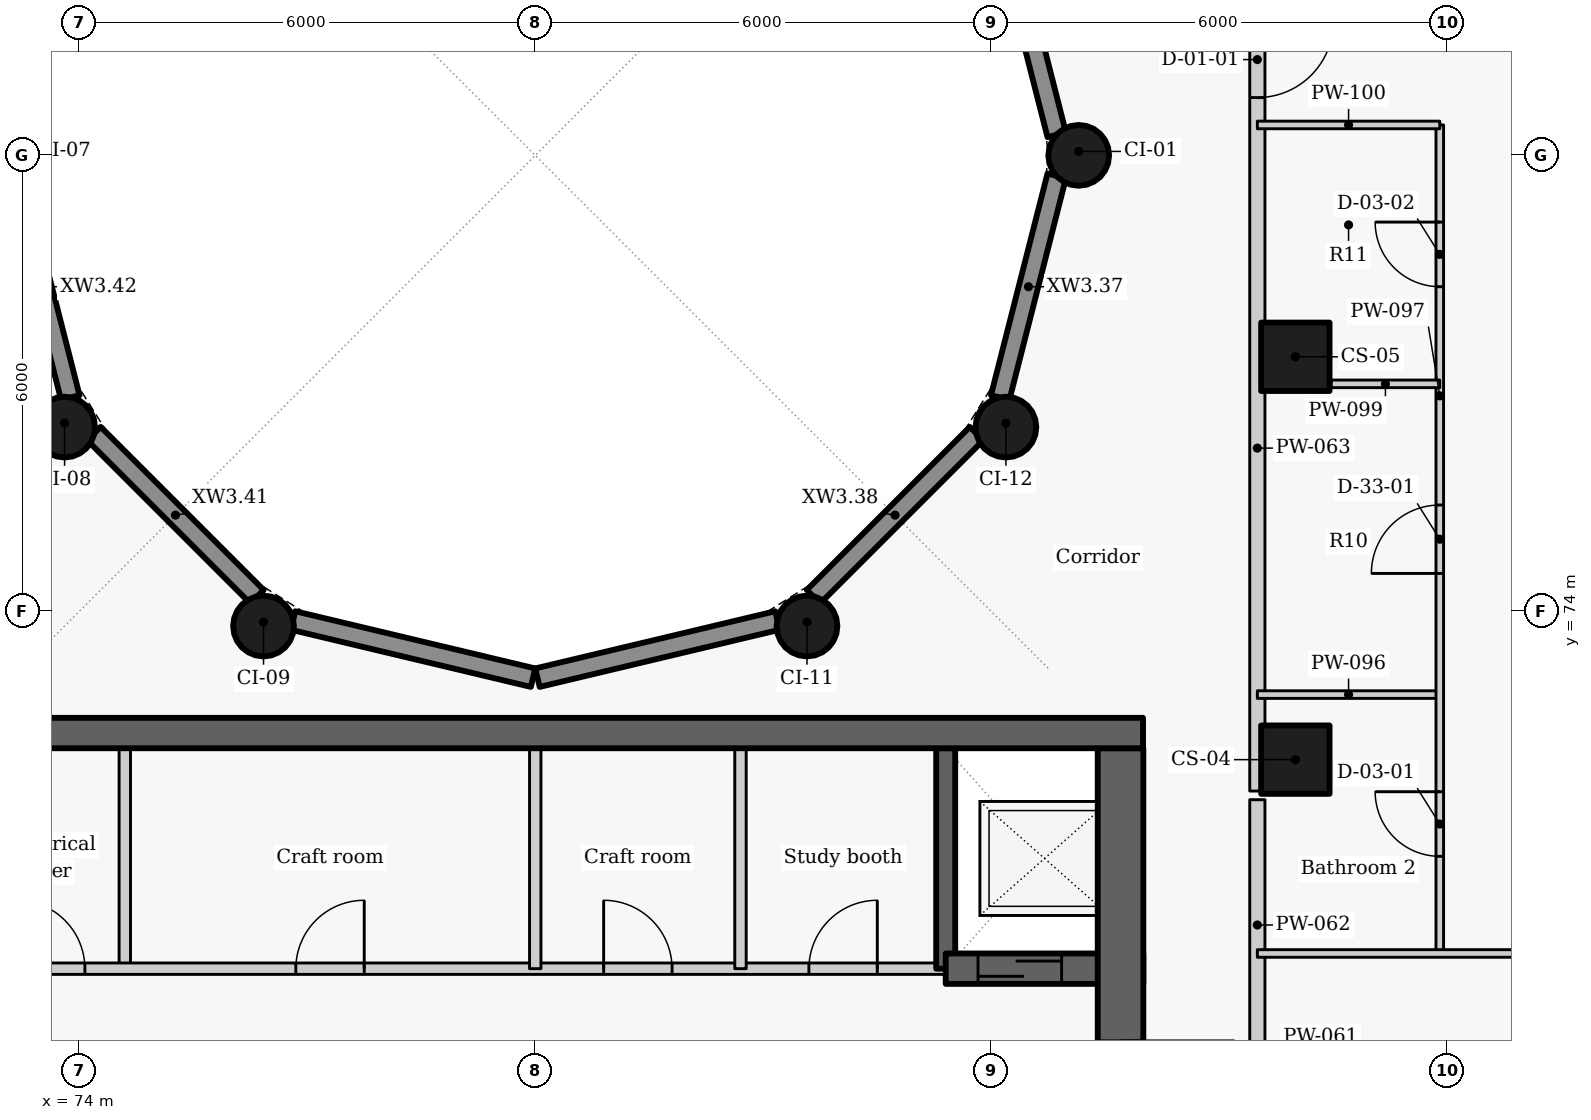
"""IFC4 building model, lengths in metres.
Left out: names, types, materials, properties, quantities, classifications, styles, units other than length and angle.
Written with IfcOpenShell. Run it as: python <this file> out.ifc"""

import sys

from ifc_helpers import new_model, si_unit, direction, frame, frame_2d, origin, origin_2d, place, context, subcontext, project, spatial, rectangle, circle, extrude, element, fill, save


model = new_model("IFC4")
c1 = context("Model", 3, precision=1e-05, world=origin(), true_north=direction((0.0, 1.0)))
c2 = subcontext(c1, "Body", "Model", "MODEL_VIEW")
j1 = project(units=[si_unit("LENGTHUNIT", "METRE"), si_unit("PLANEANGLEUNIT", "RADIAN")], contexts=[c1])
p1 = place(None, origin())
s1 = spatial("IfcSite", under=j1, at=p1, CompositionType="ELEMENT")
p2 = place(p1, origin())
s2 = spatial("IfcBuilding", under=s1, at=p2, CompositionType="ELEMENT")
p3 = place(p2, frame((0.0, 0.0, 249.3)))
s3 = spatial("IfcBuildingStorey", under=s2, at=p3, CompositionType="ELEMENT", Elevation=249.3)
for number, where, z_axis, x_axis in (
    (1, (90.0, 72.05, 0.0), (0.0, 0.0, 1.0), (0.0, 1.0, 0.0)),
    (2, (90.0, 77.35, 0.0), (0.0, 0.0, 1.0), (0.0, 1.0, 0.0)),
):
    element("IfcColumn", number, at=place(p3, frame(where, z_axis=z_axis, x_axis=x_axis)), inside=s3, PredefinedType="COLUMN", context=c2, shape_type="SweptSolid", body=[
        extrude(rectangle(XDim=0.9, YDim=0.9, at=origin_2d()), origin(), (0.0, 0.0, 1.0), 3.3),
    ])
for number, where, z_axis, x_axis in (
    (3, (87.15, 80.0, 0.0), (0.0, 0.0, 1.0), (0.0, 1.0, 0.0)),
    (4, (73.808, 76.425, 0.0), (0.0, 0.0, 1.0), (0.5, -0.866, 0.0)),
    (5, (76.425, 73.808, 0.0), (0.0, 0.0, 1.0), (0.866, -0.5, 0.0)),
    (6, (83.575, 73.808, 0.0), (0.0, 0.0, 1.0), (0.866, 0.5, 0.0)),
    (7, (86.192, 76.425, 0.0), (0.0, 0.0, 1.0), (0.5, 0.866, 0.0)),
):
    element("IfcColumn", number, at=place(p3, frame(where, z_axis=z_axis, x_axis=x_axis)), inside=s3, PredefinedType="COLUMN", context=c2, shape_type="SweptSolid", body=[
        extrude(circle(Radius=0.4, at=origin_2d()), origin(), (0.0, 0.0, 1.0), 3.3),
    ])
p4 = place(p3, frame((86.86, 79.73, 0.0), z_axis=(0.0, 0.0, 1.0), x_axis=(-0.247055971283, -0.969001211069, 0.0)))
e8 = element("IfcWall", 8, at=p4, inside=s3, PredefinedType="SOLIDWALL", context=c2, shape_type="SweptSolid", body=[
    extrude(rectangle(XDim=3.01, YDim=0.25, at=frame_2d((1.505, 0.0))), origin(), (0.0, 0.0, 1.0), 2.425),
])
p5 = place(p3, frame((85.806, 76.339, 0.0), z_axis=(0.0, 0.0, 1.0), x_axis=(-0.707106781187, -0.707106781187, 0.0)))
e9 = element("IfcWall", 9, at=p5, inside=s3, PredefinedType="SOLIDWALL", context=c2, shape_type="SweptSolid", body=[
    extrude(rectangle(XDim=3.033, YDim=0.25, at=frame_2d((1.517, 0.0))), origin(), (0.0, 0.0, 1.0), 2.425),
])
for number, where, z_axis, x_axis in (
    (10, (83.186, 73.881, 0.0), (0.0, 0.0, 1.0), (-0.973, -0.232, 0.0)),
    (11, (79.971, 73.128, 0.0), (0.0, 0.0, 1.0), (-0.973, 0.232, 0.0)),
):
    element("IfcWall", number, at=place(p3, frame(where, z_axis=z_axis, x_axis=x_axis)), inside=s3, PredefinedType="SOLIDWALL", context=c2, shape_type="SweptSolid", body=[
        extrude(rectangle(XDim=3.246, YDim=0.25, at=frame_2d((1.623, 0.0))), origin(), (0.0, 0.0, 1.0), 2.425),
    ])
p6 = place(p3, frame((76.339, 74.194, 0.0), z_axis=(0.0, 0.0, 1.0), x_axis=(-0.707106781187, 0.707106781187, 0.0)))
e12 = element("IfcWall", 12, at=p6, inside=s3, PredefinedType="SOLIDWALL", context=c2, shape_type="SweptSolid", body=[
    extrude(rectangle(XDim=3.033, YDim=0.25, at=frame_2d((1.517, 0.0))), origin(), (0.0, 0.0, 1.0), 2.425),
])
for number, where, z_axis, x_axis in (
    (13, (73.883, 76.813, 0.0), (0.0, 0.0, 1.0), (-0.247, 0.969, 0.0)),
    (14, (73.14, 80.27, 0.0), (0.0, 0.0, 1.0), (0.247, 0.969, 0.0)),
    (15, (86.117, 83.187, 0.0), (0.0, 0.0, 1.0), (0.247, -0.969, 0.0)),
):
    element("IfcWall", number, at=place(p3, frame(where, z_axis=z_axis, x_axis=x_axis)), inside=s3, PredefinedType="SOLIDWALL", context=c2, shape_type="SweptSolid", body=[
        extrude(rectangle(XDim=3.01, YDim=0.25, at=frame_2d((1.505, 0.0))), origin(), (0.0, 0.0, 1.0), 2.425),
    ])
p7 = place(p3, frame((74.6, 69.3, 0.0), z_axis=(0.0, 0.0, 1.0), x_axis=(0.0, 1.0, 0.0)))
e16 = element("IfcWall", 16, at=p7, inside=s3, PredefinedType="PARTITIONING", context=c2, shape_type="SweptSolid", body=[
    extrude(rectangle(XDim=2.9, YDim=0.15, at=frame_2d((1.45, 0.0))), origin(), (0.0, 0.0, 1.0), 3.025),
])
p8 = place(p3, frame((72.0, 69.3, 0.0), z_axis=(0.0, 0.0, 1.0), x_axis=(1.0, 0.0, 0.0)))
e17 = element("IfcWall", 17, at=p8, inside=s3, PredefinedType="PARTITIONING", context=c2, shape_type="SweptSolid", body=[
    extrude(rectangle(XDim=13.4, YDim=0.15, at=frame_2d((6.7, 0.0))), origin(), (0.0, 0.0, 1.0), 3.025),
])
p9 = place(p8, frame((1.175, 0.0, 0.0)))
e18 = element("IfcOpeningElement", 18, at=p9, cuts=e17, PredefinedType="OPENING", context=c2, shape_type="SweptSolid", body=[
    extrude(rectangle(XDim=0.9, YDim=2.1, at=frame_2d((0.45, 1.05))), frame((0.0, 0.085, 0.0), z_axis=(0.0, -1.0, 0.0), x_axis=(1.0, 0.0, 0.0)), (0.0, 0.0, 1.0), 0.17),
])
p10 = place(p8, frame((4.85, 0.0, 0.0)))
e19 = element("IfcOpeningElement", 19, at=p10, cuts=e17, PredefinedType="OPENING", context=c2, shape_type="SweptSolid", body=[
    extrude(rectangle(XDim=0.9, YDim=2.1, at=frame_2d((0.45, 1.05))), frame((0.0, 0.085, 0.0), z_axis=(0.0, -1.0, 0.0), x_axis=(1.0, 0.0, 0.0)), (0.0, 0.0, 1.0), 0.17),
])
p11 = place(p8, frame((8.9, 0.0, 0.0)))
e20 = element("IfcOpeningElement", 20, at=p11, cuts=e17, PredefinedType="OPENING", context=c2, shape_type="SweptSolid", body=[
    extrude(rectangle(XDim=0.9, YDim=2.1, at=frame_2d((0.45, 1.05))), frame((0.0, 0.085, 0.0), z_axis=(0.0, -1.0, 0.0), x_axis=(1.0, 0.0, 0.0)), (0.0, 0.0, 1.0), 0.17),
])
p12 = place(p8, frame((11.6, 0.0, 0.0)))
e21 = element("IfcOpeningElement", 21, at=p12, cuts=e17, PredefinedType="OPENING", context=c2, shape_type="SweptSolid", body=[
    extrude(rectangle(XDim=0.9, YDim=2.1, at=frame_2d((0.45, 1.05))), frame((0.0, 0.085, 0.0), z_axis=(0.0, -1.0, 0.0), x_axis=(1.0, 0.0, 0.0)), (0.0, 0.0, 1.0), 0.17),
])
p13 = place(p3, frame((85.4, 69.3, -0.275), z_axis=(0.0, 0.0, 1.0), x_axis=(0.0, 1.0, 0.0)))
e22 = element("IfcWall", 22, at=p13, inside=s3, PredefinedType="SHEAR", context=c2, shape_type="SweptSolid", body=[
    extrude(rectangle(XDim=2.9, YDim=0.25, at=frame_2d((1.45, 0.0))), origin(), (0.0, 0.0, 1.0), 3.3),
])
p14 = place(p3, frame((85.4, 69.3, -0.275), z_axis=(0.0, 0.0, 1.0), x_axis=(1.0, 0.0, 0.0)))
e23 = element("IfcWall", 23, at=p14, inside=s3, PredefinedType="SHEAR", context=c2, shape_type="SweptSolid", body=[
    extrude(rectangle(XDim=2.6, YDim=0.4, at=frame_2d((1.3, 0.0))), origin(), (0.0, 0.0, 1.0), 3.3),
])
p15 = place(p14, frame((0.425, 0.0, 0.275)))
e24 = element("IfcOpeningElement", 24, at=p15, cuts=e23, PredefinedType="OPENING", context=c2, shape_type="SweptSolid", body=[
    extrude(rectangle(XDim=1.1, YDim=2.1, at=frame_2d((0.55, 1.05))), frame((0.0, 0.21, 0.0), z_axis=(0.0, -1.0, 0.0), x_axis=(1.0, 0.0, 0.0)), (0.0, 0.0, 1.0), 0.42),
])
p16 = place(p3, frame((87.7, 72.2, -0.275), z_axis=(0.0, 0.0, 1.0), x_axis=(0.0, -1.0, 0.0)))
e25 = element("IfcWall", 25, at=p16, inside=s3, PredefinedType="SHEAR", context=c2, shape_type="SweptSolid", body=[
    extrude(rectangle(XDim=14.25, YDim=0.6, at=frame_2d((7.125, 0.0))), origin(), (0.0, 0.0, 1.0), 3.3),
])
p17 = place(p16, frame((3.85, 0.0, 0.275)))
e26 = element("IfcOpeningElement", 26, at=p17, cuts=e25, PredefinedType="OPENING", context=c2, shape_type="SweptSolid", body=[
    extrude(rectangle(XDim=1.5, YDim=2.1, at=frame_2d((0.75, 1.05))), frame((0.0, 0.31, 0.0), z_axis=(0.0, -1.0, 0.0), x_axis=(1.0, 0.0, 0.0)), (0.0, 0.0, 1.0), 0.62),
])
p18 = place(p16, frame((11.125, 0.0, 0.275)))
e27 = element("IfcOpeningElement", 27, at=p18, cuts=e25, PredefinedType="OPENING", context=c2, shape_type="SweptSolid", body=[
    extrude(rectangle(XDim=1.1, YDim=2.1, at=frame_2d((0.55, 1.05))), frame((0.0, 0.31, 0.0), z_axis=(0.0, -1.0, 0.0), x_axis=(1.0, 0.0, 0.0)), (0.0, 0.0, 1.0), 0.62),
])
for number, where, z_axis, x_axis in (
    (28, (80.0, 69.3, 0.0), (0.0, 0.0, 1.0), (0.0, 1.0, 0.0)),
    (29, (82.7, 69.3, 0.0), (0.0, 0.0, 1.0), (0.0, 1.0, 0.0)),
):
    element("IfcWall", number, at=place(p3, frame(where, z_axis=z_axis, x_axis=x_axis)), inside=s3, PredefinedType="PARTITIONING", context=c2, shape_type="SweptSolid", body=[
        extrude(rectangle(XDim=2.9, YDim=0.15, at=frame_2d((1.45, 0.0))), origin(), (0.0, 0.0, 1.0), 3.025),
    ])
p19 = place(p3, frame((89.5, 68.227, 0.0), z_axis=(0.0, 0.0, 1.0), x_axis=(0.0, 1.0, 0.0)))
e30 = element("IfcWall", 30, at=p19, inside=s3, PredefinedType="PARTITIONING", context=c2, shape_type="SweptSolid", body=[
    extrude(rectangle(XDim=3.296, YDim=0.2, at=frame_2d((1.648, 0.0))), origin(), (0.0, 0.0, 1.0), 3.025),
])
p20 = place(p3, frame((89.5, 82.123, 0.0), z_axis=(0.0, 0.0, 1.0), x_axis=(0.0, -1.0, 0.0)))
e31 = element("IfcWall", 31, at=p20, inside=s3, PredefinedType="PARTITIONING", context=c2, shape_type="SweptSolid", body=[
    extrude(rectangle(XDim=10.486, YDim=0.2, at=frame_2d((5.243, 0.0))), origin(), (0.0, 0.0, 1.0), 3.025),
])
p21 = place(p20, frame((0.363, 0.0, 0.0)))
e32 = element("IfcOpeningElement", 32, at=p21, cuts=e31, PredefinedType="OPENING", context=c2, shape_type="SweptSolid", body=[
    extrude(rectangle(XDim=1.0, YDim=2.1, at=frame_2d((0.5, 1.05))), frame((0.0, 0.11, 0.0), z_axis=(0.0, -1.0, 0.0), x_axis=(1.0, 0.0, 0.0)), (0.0, 0.0, 1.0), 0.22),
])
p22 = place(p3, frame((89.5, 72.906, 0.0), z_axis=(0.0, 0.0, 1.0), x_axis=(1.0, 0.0, 0.0)))
e33 = element("IfcWall", 33, at=p22, inside=s3, PredefinedType="PARTITIONING", context=c2, shape_type="SweptSolid", body=[
    extrude(rectangle(XDim=2.4, YDim=0.1, at=frame_2d((1.2, 0.0))), origin(), (0.0, 0.0, 1.0), 2.505),
])
p23 = place(p3, frame((91.9, 69.5, 0.0), z_axis=(0.0, 0.0, 1.0), x_axis=(0.0, 1.0, 0.0)))
e34 = element("IfcWall", 34, at=p23, inside=s3, PredefinedType="PARTITIONING", context=c2, shape_type="SweptSolid", body=[
    extrude(rectangle(XDim=10.9, YDim=0.1, at=frame_2d((5.45, 0.0))), origin(), (0.0, 0.0, 1.0), 3.025),
])
p24 = place(p23, frame((1.278, 0.0, 0.0)))
e35 = element("IfcOpeningElement", 35, at=p24, cuts=e34, PredefinedType="OPENING", context=c2, shape_type="SweptSolid", body=[
    extrude(rectangle(XDim=0.85, YDim=2.1, at=frame_2d((0.425, 1.05))), frame((0.0, 0.06, 0.0), z_axis=(0.0, -1.0, 0.0), x_axis=(1.0, 0.0, 0.0)), (0.0, 0.0, 1.0), 0.12),
])
p25 = place(p23, frame((5.0, 0.0, 0.0)))
e36 = element("IfcOpeningElement", 36, at=p25, cuts=e34, PredefinedType="OPENING", context=c2, shape_type="SweptSolid", body=[
    extrude(rectangle(XDim=0.9, YDim=2.1, at=frame_2d((0.45, 1.05))), frame((0.0, 0.06, 0.0), z_axis=(0.0, -1.0, 0.0), x_axis=(1.0, 0.0, 0.0)), (0.0, 0.0, 1.0), 0.12),
])
p26 = place(p23, frame((8.772, 0.0, 0.0)))
e37 = element("IfcOpeningElement", 37, at=p26, cuts=e34, PredefinedType="OPENING", context=c2, shape_type="SweptSolid", body=[
    extrude(rectangle(XDim=0.85, YDim=2.1, at=frame_2d((0.425, 1.05))), frame((0.0, 0.06, 0.0), z_axis=(0.0, -1.0, 0.0), x_axis=(1.0, 0.0, 0.0)), (0.0, 0.0, 1.0), 0.12),
])
p27 = place(p3, frame((89.5, 69.5, 0.0), z_axis=(0.0, 0.0, 1.0), x_axis=(1.0, 0.0, 0.0)))
e38 = element("IfcWall", 38, at=p27, inside=s3, PredefinedType="PARTITIONING", context=c2, shape_type="SweptSolid", body=[
    extrude(rectangle(XDim=10.245, YDim=0.1, at=frame_2d((5.123, 0.0))), origin(), (0.0, 0.0, 1.0), 2.405),
])
p28 = place(p3, frame((90.47, 76.994, 0.0), z_axis=(0.0, 0.0, 1.0), x_axis=(1.0, 0.0, 0.0)))
e39 = element("IfcWall", 39, at=p28, inside=s3, PredefinedType="PARTITIONING", context=c2, shape_type="SweptSolid", body=[
    extrude(rectangle(XDim=1.43, YDim=0.1, at=frame_2d((0.715, 0.0))), origin(), (0.0, 0.0, 1.0), 3.025),
])
p29 = place(p3, frame((89.5, 80.4, 0.0), z_axis=(0.0, 0.0, 1.0), x_axis=(1.0, 0.0, 0.0)))
e40 = element("IfcWall", 40, at=p29, inside=s3, PredefinedType="PARTITIONING", context=c2, shape_type="SweptSolid", body=[
    extrude(rectangle(XDim=2.4, YDim=0.1, at=frame_2d((1.2, 0.0))), origin(), (0.0, 0.0, 1.0), 2.505),
])
p30 = place(p3, frame((72.004, 72.4, -0.275), z_axis=(0.0, 0.0, 1.0), x_axis=(1.0, 0.0, 0.0)))
e41 = element("IfcWall", 41, at=p30, inside=s3, PredefinedType="SHEAR", context=c2, shape_type="SweptSolid", body=[
    extrude(rectangle(XDim=15.992, YDim=0.4, at=frame_2d((7.996, 0.0))), origin(), (0.0, 0.0, 1.0), 3.3),
])
p31 = place(p9, origin())
e42 = element("IfcDoor", 42, at=p31, inside=s3, OperationType="SINGLE_SWING_LEFT", PredefinedType="DOOR", context=c2, shape_type="SweptSolid", body=[
    extrude(rectangle(XDim=0.9, YDim=2.1, at=frame_2d((0.45, 1.05))), frame((0.0, 0.025, 0.0), z_axis=(0.0, -1.0, 0.0), x_axis=(1.0, 0.0, 0.0)), (0.0, 0.0, 1.0), 0.05),
])
fill(e18, e42)
p32 = place(p15, origin())
e43 = element("IfcDoor", 43, at=p32, inside=s3, OperationType="SLIDING_TO_LEFT", PredefinedType="DOOR", context=c2, shape_type="SweptSolid", body=[
    extrude(rectangle(XDim=1.1, YDim=2.1, at=frame_2d((0.55, 1.05))), frame((0.0, 0.025, 0.0), z_axis=(0.0, -1.0, 0.0), x_axis=(1.0, 0.0, 0.0)), (0.0, 0.0, 1.0), 0.05),
])
fill(e24, e43)
p33 = place(p10, origin())
e44 = element("IfcDoor", 44, at=p33, inside=s3, OperationType="SINGLE_SWING_RIGHT", PredefinedType="DOOR", context=c2, shape_type="SweptSolid", body=[
    extrude(rectangle(XDim=0.9, YDim=2.1, at=frame_2d((0.45, 1.05))), frame((0.0, 0.025, 0.0), z_axis=(0.0, -1.0, 0.0), x_axis=(1.0, 0.0, 0.0)), (0.0, 0.0, 1.0), 0.05),
])
fill(e19, e44)
p34 = place(p11, origin())
e45 = element("IfcDoor", 45, at=p34, inside=s3, OperationType="SINGLE_SWING_LEFT", PredefinedType="DOOR", context=c2, shape_type="SweptSolid", body=[
    extrude(rectangle(XDim=0.9, YDim=2.1, at=frame_2d((0.45, 1.05))), frame((0.0, 0.025, 0.0), z_axis=(0.0, -1.0, 0.0), x_axis=(1.0, 0.0, 0.0)), (0.0, 0.0, 1.0), 0.05),
])
fill(e20, e45)
p35 = place(p12, origin())
e46 = element("IfcDoor", 46, at=p35, inside=s3, OperationType="SINGLE_SWING_RIGHT", PredefinedType="DOOR", context=c2, shape_type="SweptSolid", body=[
    extrude(rectangle(XDim=0.9, YDim=2.1, at=frame_2d((0.45, 1.05))), frame((0.0, 0.025, 0.0), z_axis=(0.0, -1.0, 0.0), x_axis=(1.0, 0.0, 0.0)), (0.0, 0.0, 1.0), 0.05),
])
fill(e21, e46)
p36 = place(p21, origin())
e47 = element("IfcDoor", 47, at=p36, inside=s3, OperationType="SINGLE_SWING_LEFT", PredefinedType="DOOR", context=c2, shape_type="SweptSolid", body=[
    extrude(rectangle(XDim=1.0, YDim=2.1, at=frame_2d((0.5, 1.05))), frame((0.0, 0.025, 0.0), z_axis=(0.0, -1.0, 0.0), x_axis=(1.0, 0.0, 0.0)), (0.0, 0.0, 1.0), 0.05),
])
fill(e32, e47)
p37 = place(p24, origin())
e48 = element("IfcDoor", 48, at=p37, inside=s3, OperationType="SINGLE_SWING_RIGHT", PredefinedType="DOOR", context=c2, shape_type="SweptSolid", body=[
    extrude(rectangle(XDim=0.85, YDim=2.1, at=frame_2d((0.425, 1.05))), frame((0.0, 0.025, 0.0), z_axis=(0.0, -1.0, 0.0), x_axis=(1.0, 0.0, 0.0)), (0.0, 0.0, 1.0), 0.05),
])
fill(e35, e48)
p38 = place(p25, origin())
e49 = element("IfcDoor", 49, at=p38, inside=s3, OperationType="SINGLE_SWING_LEFT", PredefinedType="DOOR", context=c2, shape_type="SweptSolid", body=[
    extrude(rectangle(XDim=0.9, YDim=2.1, at=frame_2d((0.45, 1.05))), frame((0.0, 0.025, 0.0), z_axis=(0.0, -1.0, 0.0), x_axis=(1.0, 0.0, 0.0)), (0.0, 0.0, 1.0), 0.05),
])
fill(e36, e49)
p39 = place(p26, origin())
e50 = element("IfcDoor", 50, at=p39, inside=s3, OperationType="SINGLE_SWING_RIGHT", PredefinedType="DOOR", context=c2, shape_type="SweptSolid", body=[
    extrude(rectangle(XDim=0.85, YDim=2.1, at=frame_2d((0.425, 1.05))), frame((0.0, 0.025, 0.0), z_axis=(0.0, -1.0, 0.0), x_axis=(1.0, 0.0, 0.0)), (0.0, 0.0, 1.0), 0.05),
])
fill(e37, e50)
save(model, sys.argv[1])
